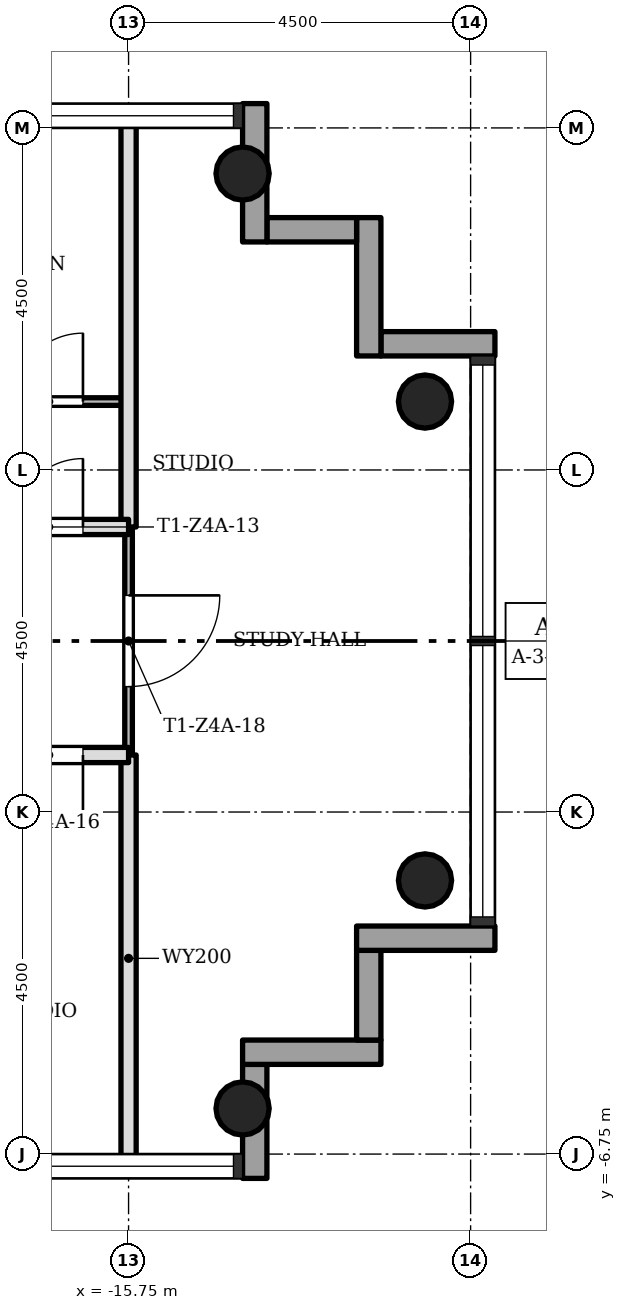
"""IFC4 building model, lengths in metres.
Left out: names, types, materials, properties, quantities, classifications, styles, units other than length and angle.
Written with IfcOpenShell. Run it as: python <this file> out.ifc"""

import sys

from ifc_helpers import new_model, si_unit, direction, frame, frame_2d, origin, origin_2d, place, context, subcontext, project, spatial, rectangle, hollow_circle, extrude, element, fill, save


model = new_model("IFC4")
c1 = context("Model", 3, precision=1e-05, world=origin(), true_north=direction((0.0, 1.0)))
c2 = subcontext(c1, "Body", "Model", "MODEL_VIEW")
j1 = project(units=[si_unit("LENGTHUNIT", "METRE"), si_unit("PLANEANGLEUNIT", "RADIAN")], contexts=[c1])
p1 = place(None, origin())
s1 = spatial("IfcSite", under=j1, at=p1, CompositionType="ELEMENT")
p2 = place(p1, origin())
s2 = spatial("IfcBuilding", under=s1, at=p2, CompositionType="ELEMENT")
p3 = place(p2, frame((0.0, 0.0, 226.6)))
s3 = spatial("IfcBuildingStorey", under=s2, at=p3, CompositionType="ELEMENT", Elevation=226.6)
for number, where, z_axis, x_axis in (
    (1, (-14.25, -6.15, 0.0), (0.0, 0.0, 1.0), (1.0, 0.0, 0.0)),
    (2, (-14.25, 6.15, 0.0), (0.0, 0.0, 1.0), (1.0, 0.0, 0.0)),
    (3, (-11.85, -3.15, 0.0), (0.0, 0.0, 1.0), (1.0, 0.0, 0.0)),
    (4, (-11.85, 3.15, 0.0), (0.0, 0.0, 1.0), (1.0, 0.0, 0.0)),
):
    element("IfcColumn", number, at=place(p3, frame(where, z_axis=z_axis, x_axis=x_axis)), inside=s3, PredefinedType="COLUMN", context=c2, shape_type="SweptSolid", body=[
        extrude(hollow_circle(Radius=0.35, WallThickness=0.025, at=origin_2d()), origin(), (0.0, 0.0, 1.0), 3.4),
    ])
p4 = place(p3, frame((-14.09, -7.07, -0.3), z_axis=(0.0, 0.0, 1.0), x_axis=(0.0, 1.0, 0.0)))
e5 = element("IfcWall", 5, at=p4, inside=s3, PredefinedType="STANDARD", context=c2, shape_type="SweptSolid", body=[
    extrude(rectangle(XDim=1.5, YDim=0.32, at=frame_2d((0.75, 0.0))), origin(), (0.0, 0.0, 1.0), 3.4),
])
p5 = place(p3, frame((-14.25, -5.41, -0.3), z_axis=(0.0, 0.0, 1.0), x_axis=(1.0, 0.0, 0.0)))
e6 = element("IfcWall", 6, at=p5, inside=s3, PredefinedType="STANDARD", context=c2, shape_type="SweptSolid", body=[
    extrude(rectangle(XDim=1.82, YDim=0.32, at=frame_2d((0.91, 0.0))), origin(), (0.0, 0.0, 1.0), 3.4),
])
p6 = place(p3, frame((-12.59, -5.25, -0.3), z_axis=(0.0, 0.0, 1.0), x_axis=(0.0, 1.0, 0.0)))
e7 = element("IfcWall", 7, at=p6, inside=s3, PredefinedType="STANDARD", context=c2, shape_type="SweptSolid", body=[
    extrude(rectangle(XDim=1.18, YDim=0.32, at=frame_2d((0.59, 0.0))), origin(), (0.0, 0.0, 1.0), 3.4),
])
p7 = place(p3, frame((-12.75, -3.91, -0.3), z_axis=(0.0, 0.0, 1.0), x_axis=(1.0, 0.0, 0.0)))
e8 = element("IfcWall", 8, at=p7, inside=s3, PredefinedType="STANDARD", context=c2, shape_type="SweptSolid", body=[
    extrude(rectangle(XDim=1.82, YDim=0.32, at=frame_2d((0.91, 0.0))), origin(), (0.0, 0.0, 1.0), 3.4),
])
p8 = place(p3, frame((-10.93, 3.91, -0.3), z_axis=(0.0, 0.0, 1.0), x_axis=(-1.0, 0.0, 0.0)))
e9 = element("IfcWall", 9, at=p8, inside=s3, PredefinedType="STANDARD", context=c2, shape_type="SweptSolid", body=[
    extrude(rectangle(XDim=1.5, YDim=0.32, at=frame_2d((0.75, 0.0))), origin(), (0.0, 0.0, 1.0), 3.4),
])
p9 = place(p3, frame((-12.59, 3.75, -0.3), z_axis=(0.0, 0.0, 1.0), x_axis=(0.0, 1.0, 0.0)))
e10 = element("IfcWall", 10, at=p9, inside=s3, PredefinedType="STANDARD", context=c2, shape_type="SweptSolid", body=[
    extrude(rectangle(XDim=1.82, YDim=0.32, at=frame_2d((0.91, 0.0))), origin(), (0.0, 0.0, 1.0), 3.4),
])
p10 = place(p3, frame((-12.75, 5.41, -0.3), z_axis=(0.0, 0.0, 1.0), x_axis=(-1.0, 0.0, 0.0)))
e11 = element("IfcWall", 11, at=p10, inside=s3, PredefinedType="STANDARD", context=c2, shape_type="SweptSolid", body=[
    extrude(rectangle(XDim=1.18, YDim=0.32, at=frame_2d((0.59, 0.0))), origin(), (0.0, 0.0, 1.0), 3.4),
])
p11 = place(p3, frame((-14.09, 5.25, -0.3), z_axis=(0.0, 0.0, 1.0), x_axis=(0.0, 1.0, 0.0)))
e12 = element("IfcWall", 12, at=p11, inside=s3, PredefinedType="STANDARD", context=c2, shape_type="SweptSolid", body=[
    extrude(rectangle(XDim=1.82, YDim=0.32, at=frame_2d((0.91, 0.0))), origin(), (0.0, 0.0, 1.0), 3.4),
])
p12 = place(p3, frame((-15.75, -1.5, 0.0), z_axis=(0.0, 0.0, 1.0), x_axis=(0.0, 1.0, 0.0)))
e13 = element("IfcWall", 13, at=p12, inside=s3, PredefinedType="PARTITIONING", context=c2, shape_type="SweptSolid", body=[
    extrude(rectangle(XDim=3.0, YDim=0.1, at=frame_2d((1.5, 0.0))), origin(), (0.0, 0.0, 1.0), 3.0),
])
p13 = place(p12, frame((0.9, 0.0, 0.0)))
e14 = element("IfcOpeningElement", 14, at=p13, cuts=e13, PredefinedType="OPENING", context=c2, shape_type="SweptSolid", body=[
    extrude(rectangle(XDim=1.2, YDim=2.1, at=frame_2d((0.6, 1.05))), frame((0.0, 0.06, 0.0), z_axis=(0.0, -1.0, 0.0), x_axis=(1.0, 0.0, 0.0)), (0.0, 0.0, 1.0), 0.12),
])
for number, where, z_axis, x_axis in (
    (15, (-15.75, -6.85, 0.0), (0.0, 0.0, 1.0), (0.0, 1.0, 0.0)),
    (16, (-15.75, 1.5, 0.0), (0.0, 0.0, 1.0), (0.0, 1.0, 0.0)),
):
    element("IfcWall", number, at=place(p3, frame(where, z_axis=z_axis, x_axis=x_axis)), inside=s3, PredefinedType="SOLIDWALL", context=c2, shape_type="SweptSolid", body=[
        extrude(rectangle(XDim=5.35, YDim=0.2, at=frame_2d((2.675, 0.0))), origin(), (0.0, 0.0, 1.0), 3.0),
    ])
p14 = place(p3, frame((-20.25, -1.5, 0.0), z_axis=(0.0, 0.0, 1.0), x_axis=(1.0, 0.0, 0.0)))
e17 = element("IfcWall", 17, at=p14, inside=s3, PredefinedType="SOLIDWALL", context=c2, shape_type="SweptSolid", body=[
    extrude(rectangle(XDim=4.5, YDim=0.2, at=frame_2d((2.25, 0.0))), origin(), (0.0, 0.0, 1.0), 3.0),
])
p15 = place(p14, frame((3.0, 0.0, 0.0)))
e18 = element("IfcOpeningElement", 18, at=p15, cuts=e17, PredefinedType="OPENING", context=c2, shape_type="SweptSolid", body=[
    extrude(rectangle(XDim=0.9, YDim=2.1, at=frame_2d((0.45, 1.05))), frame((0.0, 0.11, 0.0), z_axis=(0.0, -1.0, 0.0), x_axis=(1.0, 0.0, 0.0)), (0.0, 0.0, 1.0), 0.22),
])
p16 = place(p3, frame((-20.25, 1.5, 0.0), z_axis=(0.0, 0.0, 1.0), x_axis=(1.0, 0.0, 0.0)))
e19 = element("IfcWall", 19, at=p16, inside=s3, PredefinedType="SOLIDWALL", context=c2, shape_type="SweptSolid", body=[
    extrude(rectangle(XDim=4.5, YDim=0.2, at=frame_2d((2.25, 0.0))), origin(), (0.0, 0.0, 1.0), 3.0),
])
p17 = place(p16, frame((3.0, 0.0, 0.0)))
e20 = element("IfcOpeningElement", 20, at=p17, cuts=e19, PredefinedType="OPENING", context=c2, shape_type="SweptSolid", body=[
    extrude(rectangle(XDim=0.9, YDim=2.1, at=frame_2d((0.45, 1.05))), frame((0.0, 0.11, 0.0), z_axis=(0.0, -1.0, 0.0), x_axis=(1.0, 0.0, 0.0)), (0.0, 0.0, 1.0), 0.22),
])
p18 = place(p3, frame((-20.25, 3.15, 0.0), z_axis=(0.0, 0.0, 1.0), x_axis=(1.0, 0.0, 0.0)))
e21 = element("IfcWall", 21, at=p18, inside=s3, PredefinedType="PARTITIONING", context=c2, shape_type="SweptSolid", body=[
    extrude(rectangle(XDim=4.5, YDim=0.1, at=frame_2d((2.25, 0.0))), origin(), (0.0, 0.0, 1.0), 3.0),
])
p19 = place(p18, frame((3.0, 0.0, 0.0)))
e22 = element("IfcOpeningElement", 22, at=p19, cuts=e21, PredefinedType="OPENING", context=c2, shape_type="SweptSolid", body=[
    extrude(rectangle(XDim=0.9, YDim=2.1, at=frame_2d((0.45, 1.05))), frame((0.0, 0.06, 0.0), z_axis=(0.0, -1.0, 0.0), x_axis=(1.0, 0.0, 0.0)), (0.0, 0.0, 1.0), 0.12),
])
p20 = place(p17, origin())
e23 = element("IfcDoor", 23, at=p20, inside=s3, OperationType="SINGLE_SWING_LEFT", PredefinedType="DOOR", context=c2, shape_type="SweptSolid", body=[
    extrude(rectangle(XDim=0.9, YDim=2.1, at=frame_2d((0.45, 1.05))), frame((0.0, 0.025, 0.0), z_axis=(0.0, -1.0, 0.0), x_axis=(1.0, 0.0, 0.0)), (0.0, 0.0, 1.0), 0.05),
])
fill(e20, e23)
p21 = place(p19, origin())
e24 = element("IfcDoor", 24, at=p21, inside=s3, OperationType="SINGLE_SWING_LEFT", PredefinedType="DOOR", context=c2, shape_type="SweptSolid", body=[
    extrude(rectangle(XDim=0.9, YDim=2.1, at=frame_2d((0.45, 1.05))), frame((0.0, 0.025, 0.0), z_axis=(0.0, -1.0, 0.0), x_axis=(1.0, 0.0, 0.0)), (0.0, 0.0, 1.0), 0.05),
])
fill(e22, e24)
p22 = place(p15, origin())
e25 = element("IfcDoor", 25, at=p22, inside=s3, OperationType="SINGLE_SWING_RIGHT", PredefinedType="DOOR", context=c2, shape_type="SweptSolid", body=[
    extrude(rectangle(XDim=0.9, YDim=2.1, at=frame_2d((0.45, 1.05))), frame((0.0, 0.025, 0.0), z_axis=(0.0, -1.0, 0.0), x_axis=(1.0, 0.0, 0.0)), (0.0, 0.0, 1.0), 0.05),
])
fill(e18, e25)
p23 = place(p13, origin())
e26 = element("IfcDoor", 26, at=p23, inside=s3, OperationType="SINGLE_SWING_RIGHT", PredefinedType="DOOR", context=c2, shape_type="SweptSolid", body=[
    extrude(rectangle(XDim=1.2, YDim=2.1, at=frame_2d((0.6, 1.05))), frame((0.0, 0.025, 0.0), z_axis=(0.0, -1.0, 0.0), x_axis=(1.0, 0.0, 0.0)), (0.0, 0.0, 1.0), 0.05),
])
fill(e14, e26)
save(model, sys.argv[1])
